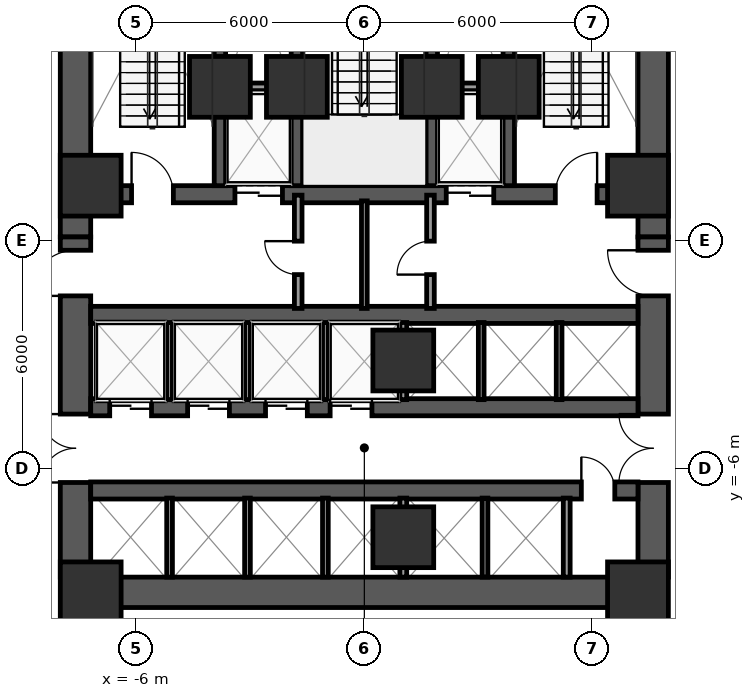
"""IFC4 building model, lengths in metres.
Left out: names, types, materials, properties, quantities, classifications, styles, units other than length and angle.
Written with IfcOpenShell. Run it as: python <this file> out.ifc"""

import sys

from ifc_helpers import new_model, si_unit, direction, frame, frame_2d, origin, origin_2d, place, context, subcontext, project, spatial, rectangle, extrude, element, fill, save


model = new_model("IFC4")
c1 = context("Model", 3, precision=1e-05, world=origin(), true_north=direction((0.0, 1.0)))
c2 = subcontext(c1, "Body", "Model", "MODEL_VIEW")
j1 = project(units=[si_unit("LENGTHUNIT", "METRE"), si_unit("PLANEANGLEUNIT", "RADIAN")], contexts=[c1])
p1 = place(None, origin())
s1 = spatial("IfcSite", under=j1, at=p1, CompositionType="ELEMENT")
p2 = place(p1, origin())
s2 = spatial("IfcBuilding", under=s1, at=p2, CompositionType="ELEMENT")
p3 = place(p2, frame((0.0, 0.0, 23.5)))
s3 = spatial("IfcBuildingStorey", under=s2, at=p3, CompositionType="ELEMENT", Elevation=23.5)
p4 = place(p3, frame((-7.2, 1.225, 0.0), z_axis=(0.0, 0.0, 1.0), x_axis=(1.0, 0.0, 0.0)))
e1 = element("IfcWall", 1, at=p4, inside=s3, PredefinedType="SHEAR", context=c2, shape_type="SweptSolid", body=[
    extrude(rectangle(XDim=14.4, YDim=0.45, at=frame_2d((7.2, 0.0))), origin(), (0.0, 0.0, 1.0), 5.15),
])
p5 = place(p4, frame((3.795, 0.0, 0.0)))
e2 = element("IfcOpeningElement", 2, at=p5, cuts=e1, PredefinedType="OPENING", context=c2, shape_type="SweptSolid", body=[
    extrude(rectangle(XDim=1.25, YDim=2.25, at=frame_2d((0.625, 1.125))), frame((0.0, 0.235, 0.0), z_axis=(0.0, -1.0, 0.0), x_axis=(1.0, 0.0, 0.0)), (0.0, 0.0, 1.0), 0.47),
])
p6 = place(p4, frame((9.355, 0.0, 0.0)))
e3 = element("IfcOpeningElement", 3, at=p6, cuts=e1, PredefinedType="OPENING", context=c2, shape_type="SweptSolid", body=[
    extrude(rectangle(XDim=1.25, YDim=2.25, at=frame_2d((0.625, 1.125))), frame((0.0, 0.235, 0.0), z_axis=(0.0, -1.0, 0.0), x_axis=(1.0, 0.0, 0.0)), (0.0, 0.0, 1.0), 0.47),
])
p7 = place(p4, frame((1.075, 0.0, 0.0)))
e4 = element("IfcOpeningElement", 4, at=p7, cuts=e1, PredefinedType="OPENING", context=c2, shape_type="SweptSolid", body=[
    extrude(rectangle(XDim=1.1, YDim=2.15, at=frame_2d((0.55, 1.075))), frame((0.0, 0.235, 0.0), z_axis=(0.0, -1.0, 0.0), x_axis=(1.0, 0.0, 0.0)), (0.0, 0.0, 1.0), 0.47),
])
p8 = place(p4, frame((12.225, 0.0, 0.0)))
e5 = element("IfcOpeningElement", 5, at=p8, cuts=e1, PredefinedType="OPENING", context=c2, shape_type="SweptSolid", body=[
    extrude(rectangle(XDim=1.1, YDim=2.15, at=frame_2d((0.55, 1.075))), frame((0.0, 0.235, 0.0), z_axis=(0.0, -1.0, 0.0), x_axis=(1.0, 0.0, 0.0)), (0.0, 0.0, 1.0), 0.47),
])
for number, where, z_axis, x_axis in (
    (6, (-3.8, 1.45, 0.0), (0.0, 0.0, 1.0), (0.0, 1.0, 0.0)),
    (7, (-1.775, 1.45, 0.0), (0.0, 0.0, 1.0), (0.0, 1.0, 0.0)),
    (8, (1.775, 1.45, 0.0), (0.0, 0.0, 1.0), (0.0, 1.0, 0.0)),
    (9, (3.8, 1.45, 0.0), (0.0, 0.0, 1.0), (0.0, 1.0, 0.0)),
):
    element("IfcWall", number, at=place(p3, frame(where, z_axis=z_axis, x_axis=x_axis)), inside=s3, PredefinedType="SHEAR", context=c2, shape_type="SweptSolid", body=[
        extrude(rectangle(XDim=7.7, YDim=0.3, at=frame_2d((3.85, 0.0))), origin(), (0.0, 0.0, 1.0), 5.15),
    ])
for number, where, z_axis, x_axis in (
    (10, (-7.6, 0.1, 0.0), (0.0, 0.0, 1.0), (0.0, 1.0, 0.0)),
    (11, (7.6, 0.1, 0.0), (0.0, 0.0, 1.0), (0.0, 1.0, 0.0)),
):
    element("IfcWall", number, at=place(p3, frame(where, z_axis=z_axis, x_axis=x_axis)), inside=s3, PredefinedType="SHEAR", context=c2, shape_type="SweptSolid", body=[
        extrude(rectangle(XDim=9.05, YDim=0.8, at=frame_2d((4.525, 0.0))), origin(), (0.0, 0.0, 1.0), 5.15),
    ])
p9 = place(p3, frame((-7.6, -8.85, 0.0), z_axis=(0.0, 0.0, 1.0), x_axis=(0.0, 1.0, 0.0)))
e12 = element("IfcWall", 12, at=p9, inside=s3, PredefinedType="SHEAR", context=c2, shape_type="SweptSolid", body=[
    extrude(rectangle(XDim=8.95, YDim=0.8, at=frame_2d((4.475, 0.0))), origin(), (0.0, 0.0, 1.0), 5.15),
])
p10 = place(p9, frame((2.49, 0.0, 0.0)))
e13 = element("IfcOpeningElement", 13, at=p10, cuts=e12, PredefinedType="OPENING", context=c2, shape_type="SweptSolid", body=[
    extrude(rectangle(XDim=1.8, YDim=2.2, at=frame_2d((0.9, 1.1))), frame((0.0, 0.41, 0.0), z_axis=(0.0, -1.0, 0.0), x_axis=(1.0, 0.0, 0.0)), (0.0, 0.0, 1.0), 0.82),
])
p11 = place(p9, frame((7.4, 0.0, 0.0)))
e14 = element("IfcOpeningElement", 14, at=p11, cuts=e12, PredefinedType="OPENING", context=c2, shape_type="SweptSolid", body=[
    extrude(rectangle(XDim=1.2, YDim=2.15, at=frame_2d((0.6, 1.075))), frame((0.0, 0.41, 0.0), z_axis=(0.0, -1.0, 0.0), x_axis=(1.0, 0.0, 0.0)), (0.0, 0.0, 1.0), 0.82),
])
p12 = place(p3, frame((7.6, -8.85, 0.0), z_axis=(0.0, 0.0, 1.0), x_axis=(0.0, 1.0, 0.0)))
e15 = element("IfcWall", 15, at=p12, inside=s3, PredefinedType="SHEAR", context=c2, shape_type="SweptSolid", body=[
    extrude(rectangle(XDim=8.95, YDim=0.8, at=frame_2d((4.475, 0.0))), origin(), (0.0, 0.0, 1.0), 5.15),
])
p13 = place(p12, frame((2.49, 0.0, 0.0)))
e16 = element("IfcOpeningElement", 16, at=p13, cuts=e15, PredefinedType="OPENING", context=c2, shape_type="SweptSolid", body=[
    extrude(rectangle(XDim=1.8, YDim=2.2, at=frame_2d((0.9, 1.1))), frame((0.0, 0.41, 0.0), z_axis=(0.0, -1.0, 0.0), x_axis=(1.0, 0.0, 0.0)), (0.0, 0.0, 1.0), 0.82),
])
p14 = place(p12, frame((7.4, 0.0, 0.0)))
e17 = element("IfcOpeningElement", 17, at=p14, cuts=e15, PredefinedType="OPENING", context=c2, shape_type="SweptSolid", body=[
    extrude(rectangle(XDim=1.2, YDim=2.15, at=frame_2d((0.6, 1.075))), frame((0.0, 0.41, 0.0), z_axis=(0.0, -1.0, 0.0), x_axis=(1.0, 0.0, 0.0)), (0.0, 0.0, 1.0), 0.82),
])
p15 = place(p3, frame((-7.6, -9.25, 0.0), z_axis=(0.0, 0.0, 1.0), x_axis=(1.0, 0.0, 0.0)))
e18 = element("IfcWall", 18, at=p15, inside=s3, PredefinedType="SHEAR", context=c2, shape_type="SweptSolid", body=[
    extrude(rectangle(XDim=15.2, YDim=0.8, at=frame_2d((7.6, 0.0))), origin(), (0.0, 0.0, 1.0), 5.15),
])
p16 = place(p3, frame((-7.2, -1.95, 0.0), z_axis=(0.0, 0.0, 1.0), x_axis=(1.0, 0.0, 0.0)))
e19 = element("IfcWall", 19, at=p16, inside=s3, PredefinedType="SHEAR", context=c2, shape_type="SweptSolid", body=[
    extrude(rectangle(XDim=14.4, YDim=0.45, at=frame_2d((7.2, 0.0))), origin(), (0.0, 0.0, 1.0), 5.15),
])
p17 = place(p3, frame((-7.2, -4.38, 0.0), z_axis=(0.0, 0.0, 1.0), x_axis=(1.0, 0.0, 0.0)))
e20 = element("IfcWall", 20, at=p17, inside=s3, PredefinedType="SHEAR", context=c2, shape_type="SweptSolid", body=[
    extrude(rectangle(XDim=14.4, YDim=0.45, at=frame_2d((7.2, 0.0))), origin(), (0.0, 0.0, 1.0), 5.15),
])
p18 = place(p17, frame((0.5, 0.0, 0.0)))
e21 = element("IfcOpeningElement", 21, at=p18, cuts=e20, PredefinedType="OPENING", context=c2, shape_type="SweptSolid", body=[
    extrude(rectangle(XDim=1.1, YDim=2.2, at=frame_2d((0.55, 1.1))), frame((0.0, 0.235, 0.0), z_axis=(0.0, -1.0, 0.0), x_axis=(1.0, 0.0, 0.0)), (0.0, 0.0, 1.0), 0.47),
])
p19 = place(p17, frame((2.55, 0.0, 0.0)))
e22 = element("IfcOpeningElement", 22, at=p19, cuts=e20, PredefinedType="OPENING", context=c2, shape_type="SweptSolid", body=[
    extrude(rectangle(XDim=1.1, YDim=2.2, at=frame_2d((0.55, 1.1))), frame((0.0, 0.235, 0.0), z_axis=(0.0, -1.0, 0.0), x_axis=(1.0, 0.0, 0.0)), (0.0, 0.0, 1.0), 0.47),
])
p20 = place(p17, frame((4.6, 0.0, 0.0)))
e23 = element("IfcOpeningElement", 23, at=p20, cuts=e20, PredefinedType="OPENING", context=c2, shape_type="SweptSolid", body=[
    extrude(rectangle(XDim=1.1, YDim=2.2, at=frame_2d((0.55, 1.1))), frame((0.0, 0.235, 0.0), z_axis=(0.0, -1.0, 0.0), x_axis=(1.0, 0.0, 0.0)), (0.0, 0.0, 1.0), 0.47),
])
p21 = place(p17, frame((6.3, 0.0, 0.0)))
e24 = element("IfcOpeningElement", 24, at=p21, cuts=e20, PredefinedType="OPENING", context=c2, shape_type="SweptSolid", body=[
    extrude(rectangle(XDim=1.1, YDim=2.2, at=frame_2d((0.55, 1.1))), frame((0.0, 0.235, 0.0), z_axis=(0.0, -1.0, 0.0), x_axis=(1.0, 0.0, 0.0)), (0.0, 0.0, 1.0), 0.47),
])
p22 = place(p3, frame((-7.2, -6.57, 0.0), z_axis=(0.0, 0.0, 1.0), x_axis=(1.0, 0.0, 0.0)))
e25 = element("IfcWall", 25, at=p22, inside=s3, PredefinedType="SHEAR", context=c2, shape_type="SweptSolid", body=[
    extrude(rectangle(XDim=14.4, YDim=0.45, at=frame_2d((7.2, 0.0))), origin(), (0.0, 0.0, 1.0), 5.15),
])
p23 = place(p22, frame((12.91, 0.0, 0.0)))
e26 = element("IfcOpeningElement", 26, at=p23, cuts=e25, PredefinedType="OPENING", context=c2, shape_type="SweptSolid", body=[
    extrude(rectangle(XDim=0.88, YDim=2.15, at=frame_2d((0.44, 1.075))), frame((0.0, 0.235, 0.0), z_axis=(0.0, -1.0, 0.0), x_axis=(1.0, 0.0, 0.0)), (0.0, 0.0, 1.0), 0.47),
])
for number, where, z_axis, x_axis in (
    (27, (-7.2, -9.25, 0.0), (0.0, 0.0, 1.0), (1.0, 0.0, 0.0)),
    (28, (7.2, -9.25, 0.0), (0.0, 0.0, 1.0), (1.0, 0.0, 0.0)),
    (29, (7.2, 1.45, 0.0), (0.0, 0.0, 1.0), (1.0, 0.0, 0.0)),
    (30, (-7.2, 1.45, 0.0), (0.0, 0.0, 1.0), (1.0, 0.0, 0.0)),
    (31, (-3.8, 4.05, 0.0), (0.0, 0.0, 1.0), (1.0, 0.0, 0.0)),
    (32, (3.8, 4.05, 0.0), (0.0, 0.0, 1.0), (1.0, 0.0, 0.0)),
    (33, (-1.775, 4.05, 0.0), (0.0, 0.0, 1.0), (1.0, 0.0, 0.0)),
    (34, (1.775, 4.05, 0.0), (0.0, 0.0, 1.0), (1.0, 0.0, 0.0)),
    (35, (1.025, -3.15, 0.0), (0.0, 0.0, 1.0), (1.0, 0.0, 0.0)),
    (36, (1.025, -7.8, 0.0), (0.0, 0.0, 1.0), (1.0, 0.0, 0.0)),
):
    element("IfcColumn", number, at=place(p3, frame(where, z_axis=z_axis, x_axis=x_axis)), inside=s3, PredefinedType="COLUMN", context=c2, shape_type="SweptSolid", body=[
        extrude(rectangle(XDim=1.6, YDim=1.6, at=origin_2d()), origin(), (0.0, 0.0, 1.0), 5.5),
    ])
for number, where, z_axis, x_axis in (
    (37, (-3.65, 4.05, 0.0), (0.0, 0.0, 1.0), (1.0, 0.0, 0.0)),
    (38, (1.92, 4.05, 0.0), (0.0, 0.0, 1.0), (1.0, 0.0, 0.0)),
):
    element("IfcWall", number, at=place(p3, frame(where, z_axis=z_axis, x_axis=x_axis)), inside=s3, PredefinedType="PARTITIONING", context=c2, shape_type="SweptSolid", body=[
        extrude(rectangle(XDim=1.73, YDim=0.2, at=frame_2d((0.865, 0.0))), origin(), (0.0, 0.0, 1.0), 5.15),
    ])
for number, where, z_axis, x_axis in (
    (39, (-5.125, -4.18, 0.0), (0.0, 0.0, 1.0), (0.0, 1.0, 0.0)),
    (40, (-3.075, -4.18, 0.0), (0.0, 0.0, 1.0), (0.0, 1.0, 0.0)),
    (41, (-1.025, -4.18, 0.0), (0.0, 0.0, 1.0), (0.0, 1.0, 0.0)),
):
    element("IfcWall", number, at=place(p3, frame(where, z_axis=z_axis, x_axis=x_axis)), inside=s3, PredefinedType="PARTITIONING", context=c2, shape_type="SweptSolid", body=[
        extrude(rectangle(XDim=2.03, YDim=0.15, at=frame_2d((1.015, 0.0))), origin(), (0.0, 0.0, 1.0), 5.15),
    ])
p24 = place(p3, frame((1.025, -4.18, 0.0), z_axis=(0.0, 0.0, 1.0), x_axis=(0.0, 1.0, 0.0)))
e42 = element("IfcWall", 42, at=p24, inside=s3, PredefinedType="PARTITIONING", context=c2, shape_type="SweptSolid", body=[
    extrude(rectangle(XDim=2.03, YDim=0.18, at=frame_2d((1.015, 0.0))), origin(), (0.0, 0.0, 1.0), 4.198),
])
for number, where, z_axis, x_axis in (
    (43, (3.075, -4.18, 0.0), (0.0, 0.0, 1.0), (0.0, 1.0, 0.0)),
    (44, (5.125, -4.18, 0.0), (0.0, 0.0, 1.0), (0.0, 1.0, 0.0)),
):
    element("IfcWall", number, at=place(p3, frame(where, z_axis=z_axis, x_axis=x_axis)), inside=s3, PredefinedType="PARTITIONING", context=c2, shape_type="SweptSolid", body=[
        extrude(rectangle(XDim=2.03, YDim=0.15, at=frame_2d((1.015, 0.0))), origin(), (0.0, 0.0, 1.0), 5.15),
    ])
for number, where, z_axis, x_axis in (
    (45, (-5.125, -8.85, 0.0), (0.0, 0.0, 1.0), (0.0, 1.0, 0.0)),
    (46, (-3.075, -8.85, 0.0), (0.0, 0.0, 1.0), (0.0, 1.0, 0.0)),
    (47, (-1.025, -8.85, 0.0), (0.0, 0.0, 1.0), (0.0, 1.0, 0.0)),
):
    element("IfcWall", number, at=place(p3, frame(where, z_axis=z_axis, x_axis=x_axis)), inside=s3, PredefinedType="PARTITIONING", context=c2, shape_type="SweptSolid", body=[
        extrude(rectangle(XDim=2.08, YDim=0.15, at=frame_2d((1.04, 0.0))), origin(), (0.0, 0.0, 1.0), 5.15),
    ])
p25 = place(p3, frame((1.025, -8.85, 0.0), z_axis=(0.0, 0.0, 1.0), x_axis=(0.0, 1.0, 0.0)))
e48 = element("IfcWall", 48, at=p25, inside=s3, PredefinedType="PARTITIONING", context=c2, shape_type="SweptSolid", body=[
    extrude(rectangle(XDim=2.08, YDim=0.18, at=frame_2d((1.04, 0.0))), origin(), (0.0, 0.0, 1.0), 4.198),
])
p26 = place(p3, frame((3.175, -8.85, 0.0), z_axis=(0.0, 0.0, 1.0), x_axis=(0.0, 1.0, 0.0)))
e49 = element("IfcWall", 49, at=p26, inside=s3, PredefinedType="PARTITIONING", context=c2, shape_type="SweptSolid", body=[
    extrude(rectangle(XDim=2.08, YDim=0.15, at=frame_2d((1.04, 0.0))), origin(), (0.0, 0.0, 1.0), 5.15),
])
p27 = place(p3, frame((5.325, -8.85, 0.0), z_axis=(0.0, 0.0, 1.0), x_axis=(0.0, 1.0, 0.0)))
e50 = element("IfcWall", 50, at=p27, inside=s3, PredefinedType="PARTITIONING", context=c2, shape_type="SweptSolid", body=[
    extrude(rectangle(XDim=2.08, YDim=0.18, at=frame_2d((1.04, 0.0))), origin(), (0.0, 0.0, 1.0), 5.15),
])
p28 = place(p3, frame((-1.74, -1.78, 0.0), z_axis=(0.0, 0.0, 1.0), x_axis=(0.0, 1.0, 0.0)))
e51 = element("IfcWall", 51, at=p28, inside=s3, PredefinedType="PARTITIONING", context=c2, shape_type="SweptSolid", body=[
    extrude(rectangle(XDim=2.98, YDim=0.2, at=frame_2d((1.49, 0.0))), origin(), (0.0, 0.0, 1.0), 5.15),
])
p29 = place(p28, frame((0.89, 0.0, 0.0)))
e52 = element("IfcOpeningElement", 52, at=p29, cuts=e51, PredefinedType="OPENING", context=c2, shape_type="SweptSolid", body=[
    extrude(rectangle(XDim=0.88, YDim=2.15, at=frame_2d((0.44, 1.075))), frame((0.0, 0.11, 0.0), z_axis=(0.0, -1.0, 0.0), x_axis=(1.0, 0.0, 0.0)), (0.0, 0.0, 1.0), 0.22),
])
p30 = place(p3, frame((1.74, -1.78, 0.0), z_axis=(0.0, 0.0, 1.0), x_axis=(0.0, 1.0, 0.0)))
e53 = element("IfcWall", 53, at=p30, inside=s3, PredefinedType="PARTITIONING", context=c2, shape_type="SweptSolid", body=[
    extrude(rectangle(XDim=2.98, YDim=0.2, at=frame_2d((1.49, 0.0))), origin(), (0.0, 0.0, 1.0), 5.15),
])
p31 = place(p30, frame((0.89, 0.0, 0.0)))
e54 = element("IfcOpeningElement", 54, at=p31, cuts=e53, PredefinedType="OPENING", context=c2, shape_type="SweptSolid", body=[
    extrude(rectangle(XDim=0.88, YDim=2.15, at=frame_2d((0.44, 1.075))), frame((0.0, 0.11, 0.0), z_axis=(0.0, -1.0, 0.0), x_axis=(1.0, 0.0, 0.0)), (0.0, 0.0, 1.0), 0.22),
])
p32 = place(p3, frame((0.0, -1.78, 0.0), z_axis=(0.0, 0.0, 1.0), x_axis=(0.0, 1.0, 0.0)))
e55 = element("IfcWall", 55, at=p32, inside=s3, PredefinedType="PARTITIONING", context=c2, shape_type="SweptSolid", body=[
    extrude(rectangle(XDim=2.83, YDim=0.15, at=frame_2d((1.415, 0.0))), origin(), (0.0, 0.0, 1.0), 5.15),
])
p33 = place(p18, origin())
e56 = element("IfcDoor", 56, at=p33, inside=s3, OperationType="DOUBLE_DOOR_SLIDING", PredefinedType="DOOR", context=c2, shape_type="SweptSolid", body=[
    extrude(rectangle(XDim=1.1, YDim=2.2, at=frame_2d((0.55, 1.1))), frame((0.0, 0.025, 0.0), z_axis=(0.0, -1.0, 0.0), x_axis=(1.0, 0.0, 0.0)), (0.0, 0.0, 1.0), 0.05),
])
fill(e21, e56)
p34 = place(p19, origin())
e57 = element("IfcDoor", 57, at=p34, inside=s3, OperationType="DOUBLE_DOOR_SLIDING", PredefinedType="DOOR", context=c2, shape_type="SweptSolid", body=[
    extrude(rectangle(XDim=1.1, YDim=2.2, at=frame_2d((0.55, 1.1))), frame((0.0, 0.025, 0.0), z_axis=(0.0, -1.0, 0.0), x_axis=(1.0, 0.0, 0.0)), (0.0, 0.0, 1.0), 0.05),
])
fill(e22, e57)
p35 = place(p20, origin())
e58 = element("IfcDoor", 58, at=p35, inside=s3, OperationType="DOUBLE_DOOR_SLIDING", PredefinedType="DOOR", context=c2, shape_type="SweptSolid", body=[
    extrude(rectangle(XDim=1.1, YDim=2.2, at=frame_2d((0.55, 1.1))), frame((0.0, 0.025, 0.0), z_axis=(0.0, -1.0, 0.0), x_axis=(1.0, 0.0, 0.0)), (0.0, 0.0, 1.0), 0.05),
])
fill(e23, e58)
p36 = place(p21, origin())
e59 = element("IfcDoor", 59, at=p36, inside=s3, OperationType="DOUBLE_DOOR_SLIDING", PredefinedType="DOOR", context=c2, shape_type="SweptSolid", body=[
    extrude(rectangle(XDim=1.1, YDim=2.2, at=frame_2d((0.55, 1.1))), frame((0.0, 0.025, 0.0), z_axis=(0.0, -1.0, 0.0), x_axis=(1.0, 0.0, 0.0)), (0.0, 0.0, 1.0), 0.05),
])
fill(e24, e59)
p37 = place(p5, origin())
e60 = element("IfcDoor", 60, at=p37, inside=s3, OperationType="DOUBLE_DOOR_SLIDING", PredefinedType="DOOR", context=c2, shape_type="SweptSolid", body=[
    extrude(rectangle(XDim=1.25, YDim=2.25, at=frame_2d((0.625, 1.125))), frame((0.0, 0.025, 0.0), z_axis=(0.0, -1.0, 0.0), x_axis=(1.0, 0.0, 0.0)), (0.0, 0.0, 1.0), 0.05),
])
fill(e2, e60)
p38 = place(p6, origin())
e61 = element("IfcDoor", 61, at=p38, inside=s3, OperationType="DOUBLE_DOOR_SLIDING", PredefinedType="DOOR", context=c2, shape_type="SweptSolid", body=[
    extrude(rectangle(XDim=1.25, YDim=2.25, at=frame_2d((0.625, 1.125))), frame((0.0, 0.025, 0.0), z_axis=(0.0, -1.0, 0.0), x_axis=(1.0, 0.0, 0.0)), (0.0, 0.0, 1.0), 0.05),
])
fill(e3, e61)
p39 = place(p7, origin())
e62 = element("IfcDoor", 62, at=p39, inside=s3, OperationType="SINGLE_SWING_LEFT", PredefinedType="DOOR", context=c2, shape_type="SweptSolid", body=[
    extrude(rectangle(XDim=1.1, YDim=2.15, at=frame_2d((0.55, 1.075))), frame((0.0, 0.025, 0.0), z_axis=(0.0, -1.0, 0.0), x_axis=(1.0, 0.0, 0.0)), (0.0, 0.0, 1.0), 0.05),
])
fill(e4, e62)
p40 = place(p8, origin())
e63 = element("IfcDoor", 63, at=p40, inside=s3, OperationType="SINGLE_SWING_RIGHT", PredefinedType="DOOR", context=c2, shape_type="SweptSolid", body=[
    extrude(rectangle(XDim=1.1, YDim=2.15, at=frame_2d((0.55, 1.075))), frame((0.0, 0.025, 0.0), z_axis=(0.0, -1.0, 0.0), x_axis=(1.0, 0.0, 0.0)), (0.0, 0.0, 1.0), 0.05),
])
fill(e5, e63)
p41 = place(p10, origin())
e64 = element("IfcDoor", 64, at=p41, inside=s3, OperationType="DOUBLE_DOOR_SINGLE_SWING", PredefinedType="DOOR", context=c2, shape_type="SweptSolid", body=[
    extrude(rectangle(XDim=1.8, YDim=2.2, at=frame_2d((0.9, 1.1))), frame((0.0, 0.025, 0.0), z_axis=(0.0, -1.0, 0.0), x_axis=(1.0, 0.0, 0.0)), (0.0, 0.0, 1.0), 0.05),
])
fill(e13, e64)
p42 = place(p11, origin())
e65 = element("IfcDoor", 65, at=p42, inside=s3, OperationType="SINGLE_SWING_LEFT", PredefinedType="DOOR", context=c2, shape_type="SweptSolid", body=[
    extrude(rectangle(XDim=1.2, YDim=2.15, at=frame_2d((0.6, 1.075))), frame((0.0, 0.025, 0.0), z_axis=(0.0, -1.0, 0.0), x_axis=(1.0, 0.0, 0.0)), (0.0, 0.0, 1.0), 0.05),
])
fill(e14, e65)
p43 = place(p13, origin())
e66 = element("IfcDoor", 66, at=p43, inside=s3, OperationType="DOUBLE_DOOR_SINGLE_SWING", PredefinedType="DOOR", context=c2, shape_type="SweptSolid", body=[
    extrude(rectangle(XDim=1.8, YDim=2.2, at=frame_2d((0.9, 1.1))), frame((0.0, 0.025, 0.0), z_axis=(0.0, -1.0, 0.0), x_axis=(1.0, 0.0, 0.0)), (0.0, 0.0, 1.0), 0.05),
])
fill(e16, e66)
p44 = place(p14, origin())
e67 = element("IfcDoor", 67, at=p44, inside=s3, OperationType="SINGLE_SWING_RIGHT", PredefinedType="DOOR", context=c2, shape_type="SweptSolid", body=[
    extrude(rectangle(XDim=1.2, YDim=2.15, at=frame_2d((0.6, 1.075))), frame((0.0, 0.025, 0.0), z_axis=(0.0, -1.0, 0.0), x_axis=(1.0, 0.0, 0.0)), (0.0, 0.0, 1.0), 0.05),
])
fill(e17, e67)
p45 = place(p23, origin())
e68 = element("IfcDoor", 68, at=p45, inside=s3, OperationType="SINGLE_SWING_LEFT", PredefinedType="DOOR", context=c2, shape_type="SweptSolid", body=[
    extrude(rectangle(XDim=0.88, YDim=2.15, at=frame_2d((0.44, 1.075))), frame((0.0, 0.025, 0.0), z_axis=(0.0, -1.0, 0.0), x_axis=(1.0, 0.0, 0.0)), (0.0, 0.0, 1.0), 0.05),
])
fill(e26, e68)
p46 = place(p29, origin())
e69 = element("IfcDoor", 69, at=p46, inside=s3, OperationType="SINGLE_SWING_RIGHT", PredefinedType="DOOR", context=c2, shape_type="SweptSolid", body=[
    extrude(rectangle(XDim=0.88, YDim=2.15, at=frame_2d((0.44, 1.075))), frame((0.0, 0.025, 0.0), z_axis=(0.0, -1.0, 0.0), x_axis=(1.0, 0.0, 0.0)), (0.0, 0.0, 1.0), 0.05),
])
fill(e52, e69)
p47 = place(p31, origin())
e70 = element("IfcDoor", 70, at=p47, inside=s3, OperationType="SINGLE_SWING_LEFT", PredefinedType="DOOR", context=c2, shape_type="SweptSolid", body=[
    extrude(rectangle(XDim=0.88, YDim=2.15, at=frame_2d((0.44, 1.075))), frame((0.0, 0.025, 0.0), z_axis=(0.0, -1.0, 0.0), x_axis=(1.0, 0.0, 0.0)), (0.0, 0.0, 1.0), 0.05),
])
fill(e54, e70)
save(model, sys.argv[1])
